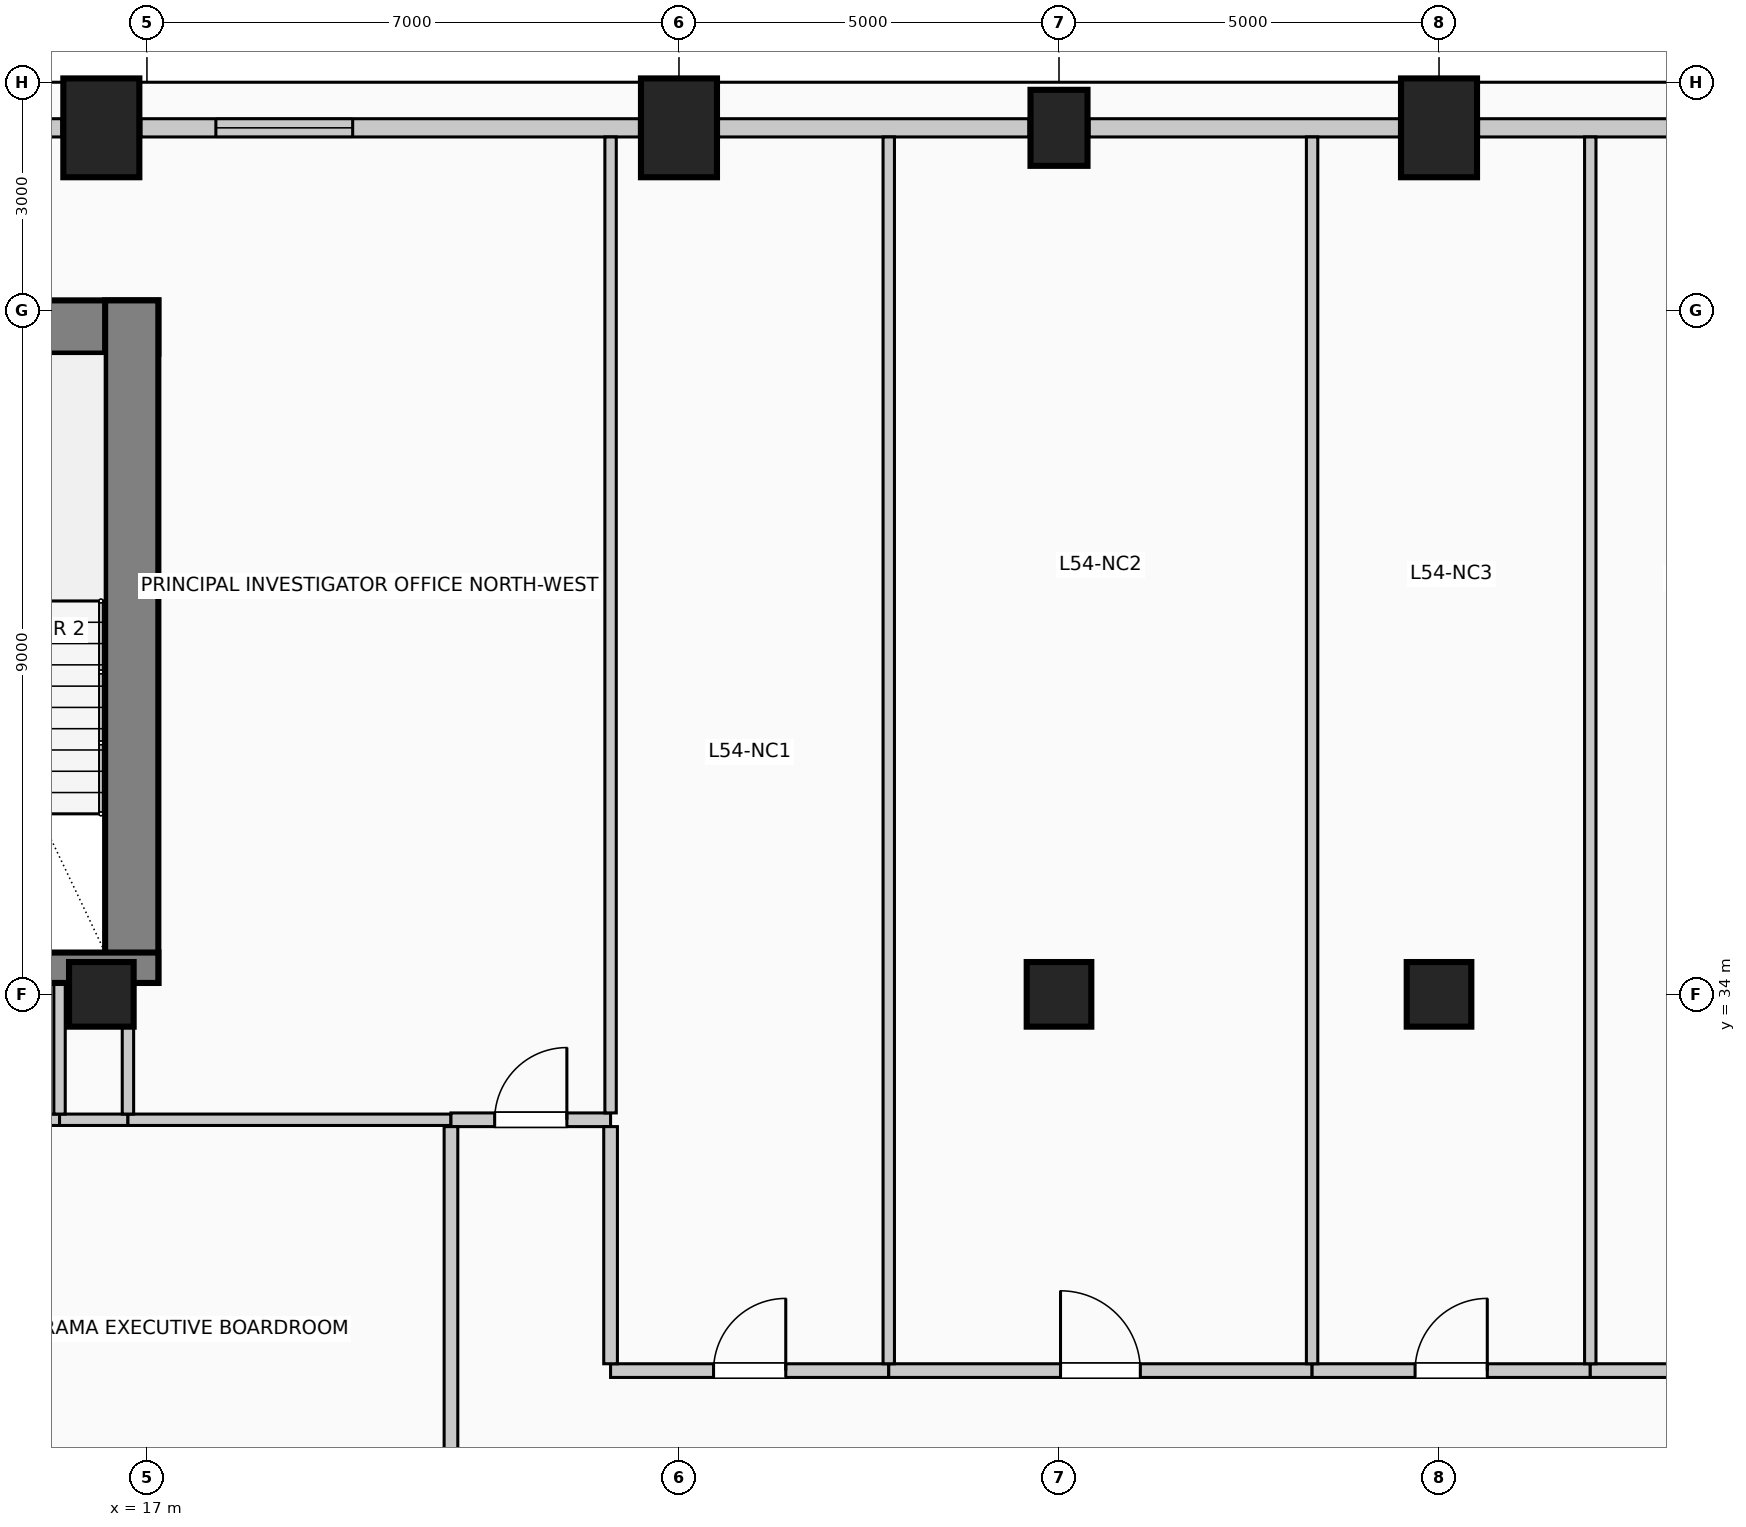
"""IFC4 building model, lengths in metres.
Left out: names, types, materials, properties, quantities, classifications, styles, units other than length and angle.
Written with IfcOpenShell. Run it as: python <this file> out.ifc"""

import sys

from ifc_helpers import new_model, si_unit, direction, frame, frame_2d, origin, origin_2d, place, context, subcontext, project, spatial, rectangle, circle, extrude, element, fill, save


model = new_model("IFC4")
c1 = context("Model", 3, precision=1e-05, world=origin(), true_north=direction((0.0, 1.0)))
c2 = subcontext(c1, "Body", "Model", "MODEL_VIEW")
j1 = project(units=[si_unit("LENGTHUNIT", "METRE"), si_unit("PLANEANGLEUNIT", "RADIAN")], contexts=[c1])
p1 = place(None, origin())
s1 = spatial("IfcSite", under=j1, at=p1, CompositionType="ELEMENT")
p2 = place(p1, origin())
s2 = spatial("IfcBuilding", under=s1, at=p2, CompositionType="ELEMENT")
p3 = place(p2, frame((0.0, 0.0, 222.6)))
s3 = spatial("IfcBuildingStorey", under=s2, at=p3, CompositionType="ELEMENT", Elevation=222.6)
p4 = place(p3, frame((2.85, 42.78, 0.0), z_axis=(0.0, 0.0, 1.0), x_axis=(1.0, 0.0, 0.0)))
e1 = element("IfcWall", 1, at=p4, inside=s3, PredefinedType="SHEAR", context=c2, shape_type="SweptSolid", body=[
    extrude(rectangle(XDim=14.3, YDim=0.7, at=frame_2d((7.15, 0.0))), origin(), (0.0, 0.0, 1.0), 4.0),
])
p5 = place(p3, frame((16.8, 34.15, 0.0), z_axis=(0.0, 0.0, 1.0), x_axis=(0.0, 1.0, 0.0)))
e2 = element("IfcWall", 2, at=p5, inside=s3, PredefinedType="SHEAR", context=c2, shape_type="SweptSolid", body=[
    extrude(rectangle(XDim=8.98, YDim=0.7, at=frame_2d((4.49, 0.0))), origin(), (0.0, 0.0, 1.0), 4.0),
])
p6 = place(p3, frame((12.29, 34.35, 0.0), z_axis=(0.0, 0.0, 1.0), x_axis=(1.0, 0.0, 0.0)))
e3 = element("IfcWall", 3, at=p6, inside=s3, PredefinedType="SHEAR", context=c2, shape_type="SweptSolid", body=[
    extrude(rectangle(XDim=4.86, YDim=0.4, at=frame_2d((2.43, 0.0))), origin(), (0.0, 0.0, 1.0), 4.0),
])
p7 = place(p6, frame((1.4, 0.0, 0.0)))
e4 = element("IfcOpeningElement", 4, at=p7, cuts=e3, PredefinedType="OPENING", context=c2, shape_type="SweptSolid", body=[
    extrude(rectangle(XDim=1.15, YDim=2.2, at=frame_2d((0.575, 1.1))), frame((0.0, 0.21, 0.0), z_axis=(0.0, -1.0, 0.0), x_axis=(1.0, 0.0, 0.0)), (0.0, 0.0, 1.0), 0.42),
])
for number, where, z_axis, x_axis in (
    (5, (16.4, 45.4, 0.0), (0.0, 0.0, 1.0), (1.0, 0.0, 0.0)),
    (6, (24.0, 45.4, 0.0), (0.0, 0.0, 1.0), (1.0, 0.0, 0.0)),
):
    element("IfcColumn", number, at=place(p3, frame(where, z_axis=z_axis, x_axis=x_axis)), inside=s3, PredefinedType="COLUMN", context=c2, shape_type="SweptSolid", body=[
        extrude(rectangle(XDim=1.0, YDim=1.3, at=origin_2d()), origin(), (0.0, 0.0, 1.0), 4.0),
    ])
p8 = place(p3, frame((29.0, 45.4, 0.0), z_axis=(0.0, 0.0, 1.0), x_axis=(1.0, 0.0, 0.0)))
e7 = element("IfcColumn", 7, at=p8, inside=s3, PredefinedType="COLUMN", context=c2, shape_type="SweptSolid", body=[
    extrude(rectangle(XDim=0.75, YDim=1.0, at=origin_2d()), origin(), (0.0, 0.0, 1.0), 4.0),
])
p9 = place(p3, frame((34.0, 45.4, 0.0), z_axis=(0.0, 0.0, 1.0), x_axis=(1.0, 0.0, 0.0)))
e8 = element("IfcColumn", 8, at=p9, inside=s3, PredefinedType="COLUMN", context=c2, shape_type="SweptSolid", body=[
    extrude(rectangle(XDim=1.0, YDim=1.3, at=origin_2d()), origin(), (0.0, 0.0, 1.0), 4.0),
])
for number, where, z_axis, x_axis in (
    (9, (16.4, 34.0, 0.0), (0.0, 0.0, 1.0), (1.0, 0.0, 0.0)),
    (10, (29.0, 34.0, 0.0), (0.0, 0.0, 1.0), (1.0, 0.0, 0.0)),
    (11, (34.0, 34.0, 0.0), (0.0, 0.0, 1.0), (1.0, 0.0, 0.0)),
):
    element("IfcColumn", number, at=place(p3, frame(where, z_axis=z_axis, x_axis=x_axis)), inside=s3, PredefinedType="COLUMN", context=c2, shape_type="SweptSolid", body=[
        extrude(circle(Radius=0.425, at=origin_2d()), origin(), (0.0, 0.0, 1.0), 4.0),
    ])
p10 = place(p3, frame((14.395, 45.4, 0.0), z_axis=(0.0, 0.0, 1.0), x_axis=(1.0, 0.0, 0.0)))
e12 = element("IfcWall", 12, at=p10, inside=s3, PredefinedType="SOLIDWALL", context=c2, shape_type="SweptSolid", body=[
    extrude(rectangle(XDim=1.485, YDim=0.24, at=frame_2d((0.742, 0.0))), origin(), (0.0, 0.0, 1.0), 3.0),
])
p11 = place(p3, frame((16.92, 45.4, 0.0), z_axis=(0.0, 0.0, 1.0), x_axis=(1.0, 0.0, 0.0)))
e13 = element("IfcWall", 13, at=p11, inside=s3, PredefinedType="SOLIDWALL", context=c2, shape_type="SweptSolid", body=[
    extrude(rectangle(XDim=6.56, YDim=0.24, at=frame_2d((3.28, 0.0))), origin(), (0.0, 0.0, 1.0), 3.0),
])
p12 = place(p11, frame((0.987, 0.0, 0.42)))
e14 = element("IfcOpeningElement", 14, at=p12, cuts=e13, PredefinedType="OPENING", context=c2, shape_type="SweptSolid", body=[
    extrude(rectangle(XDim=1.8, YDim=2.2, at=frame_2d((0.9, 1.1))), frame((0.0, 0.13, 0.0), z_axis=(0.0, -1.0, 0.0), x_axis=(1.0, 0.0, 0.0)), (0.0, 0.0, 1.0), 0.26),
])
for number, where, z_axis, x_axis in (
    (15, (24.52, 45.4, 0.0), (0.0, 0.0, 1.0), (1.0, 0.0, 0.0)),
    (16, (29.395, 45.4, 0.0), (0.0, 0.0, 1.0), (1.0, 0.0, 0.0)),
):
    element("IfcWall", number, at=place(p3, frame(where, z_axis=z_axis, x_axis=x_axis)), inside=s3, PredefinedType="SOLIDWALL", context=c2, shape_type="SweptSolid", body=[
        extrude(rectangle(XDim=4.085, YDim=0.24, at=frame_2d((2.042, 0.0))), origin(), (0.0, 0.0, 1.0), 3.0),
    ])
p13 = place(p3, frame((34.52, 45.4, 0.0), z_axis=(0.0, 0.0, 1.0), x_axis=(1.0, 0.0, 0.0)))
e17 = element("IfcWall", 17, at=p13, inside=s3, PredefinedType="SOLIDWALL", context=c2, shape_type="SweptSolid", body=[
    extrude(rectangle(XDim=6.56, YDim=0.24, at=frame_2d((3.28, 0.0))), origin(), (0.0, 0.0, 1.0), 3.0),
])
p14 = place(p13, frame((3.773, 0.0, 0.42)))
e18 = element("IfcOpeningElement", 18, at=p14, cuts=e17, PredefinedType="OPENING", context=c2, shape_type="SweptSolid", body=[
    extrude(rectangle(XDim=1.8, YDim=2.2, at=frame_2d((0.9, 1.1))), frame((0.0, 0.13, 0.0), z_axis=(0.0, -1.0, 0.0), x_axis=(1.0, 0.0, 0.0)), (0.0, 0.0, 1.0), 0.26),
])
p15 = place(p3, frame((23.1, 29.05, 0.0), z_axis=(0.0, 0.0, 1.0), x_axis=(1.0, 0.0, 0.0)))
e19 = element("IfcWall", 19, at=p15, inside=s3, PredefinedType="PARTITIONING", context=c2, shape_type="SweptSolid", body=[
    extrude(rectangle(XDim=3.66, YDim=0.18, at=frame_2d((1.83, 0.0))), origin(), (0.0, 0.0, 1.0), 3.75),
])
p16 = place(p15, frame((1.355, 0.0, 0.0)))
e20 = element("IfcOpeningElement", 20, at=p16, cuts=e19, PredefinedType="OPENING", context=c2, shape_type="SweptSolid", body=[
    extrude(rectangle(XDim=0.95, YDim=2.15, at=frame_2d((0.475, 1.075))), frame((0.0, 0.1, 0.0), z_axis=(0.0, -1.0, 0.0), x_axis=(1.0, 0.0, 0.0)), (0.0, 0.0, 1.0), 0.2),
])
p17 = place(p3, frame((26.76, 29.05, 0.0), z_axis=(0.0, 0.0, 1.0), x_axis=(1.0, 0.0, 0.0)))
e21 = element("IfcWall", 21, at=p17, inside=s3, PredefinedType="PARTITIONING", context=c2, shape_type="SweptSolid", body=[
    extrude(rectangle(XDim=5.57, YDim=0.18, at=frame_2d((2.785, 0.0))), origin(), (0.0, 0.0, 1.0), 3.75),
])
p18 = place(p17, frame((2.26, 0.0, 0.0)))
e22 = element("IfcOpeningElement", 22, at=p18, cuts=e21, PredefinedType="OPENING", context=c2, shape_type="SweptSolid", body=[
    extrude(rectangle(XDim=1.05, YDim=2.15, at=frame_2d((0.525, 1.075))), frame((0.0, 0.1, 0.0), z_axis=(0.0, -1.0, 0.0), x_axis=(1.0, 0.0, 0.0)), (0.0, 0.0, 1.0), 0.2),
])
p19 = place(p3, frame((32.33, 29.05, 0.0), z_axis=(0.0, 0.0, 1.0), x_axis=(1.0, 0.0, 0.0)))
e23 = element("IfcWall", 23, at=p19, inside=s3, PredefinedType="PARTITIONING", context=c2, shape_type="SweptSolid", body=[
    extrude(rectangle(XDim=3.66, YDim=0.18, at=frame_2d((1.83, 0.0))), origin(), (0.0, 0.0, 1.0), 3.75),
])
p20 = place(p19, frame((1.355, 0.0, 0.0)))
e24 = element("IfcOpeningElement", 24, at=p20, cuts=e23, PredefinedType="OPENING", context=c2, shape_type="SweptSolid", body=[
    extrude(rectangle(XDim=0.95, YDim=2.15, at=frame_2d((0.475, 1.075))), frame((0.0, 0.1, 0.0), z_axis=(0.0, -1.0, 0.0), x_axis=(1.0, 0.0, 0.0)), (0.0, 0.0, 1.0), 0.2),
])
p21 = place(p3, frame((35.99, 29.05, 0.0), z_axis=(0.0, 0.0, 1.0), x_axis=(1.0, 0.0, 0.0)))
e25 = element("IfcWall", 25, at=p21, inside=s3, PredefinedType="PARTITIONING", context=c2, shape_type="SweptSolid", body=[
    extrude(rectangle(XDim=5.56, YDim=0.18, at=frame_2d((2.78, 0.0))), origin(), (0.0, 0.0, 1.0), 3.75),
])
p22 = place(p21, frame((2.255, 0.0, 0.0)))
e26 = element("IfcOpeningElement", 26, at=p22, cuts=e25, PredefinedType="OPENING", context=c2, shape_type="SweptSolid", body=[
    extrude(rectangle(XDim=1.05, YDim=2.15, at=frame_2d((0.525, 1.075))), frame((0.0, 0.1, 0.0), z_axis=(0.0, -1.0, 0.0), x_axis=(1.0, 0.0, 0.0)), (0.0, 0.0, 1.0), 0.2),
])
p23 = place(p3, frame((12.33, 32.35, 0.0), z_axis=(0.0, 0.0, 1.0), x_axis=(1.0, 0.0, 0.0)))
e27 = element("IfcWall", 27, at=p23, inside=s3, PredefinedType="PARTITIONING", context=c2, shape_type="SweptSolid", body=[
    extrude(rectangle(XDim=3.52, YDim=0.15, at=frame_2d((1.76, 0.0))), origin(), (0.0, 0.0, 1.0), 3.75),
])
p24 = place(p23, frame((1.235, 0.0, 0.0)))
e28 = element("IfcOpeningElement", 28, at=p24, cuts=e27, PredefinedType="OPENING", context=c2, shape_type="SweptSolid", body=[
    extrude(rectangle(XDim=1.05, YDim=2.15, at=frame_2d((0.525, 1.075))), frame((0.0, 0.085, 0.0), z_axis=(0.0, -1.0, 0.0), x_axis=(1.0, 0.0, 0.0)), (0.0, 0.0, 1.0), 0.17),
])
p25 = place(p3, frame((15.85, 32.35, 0.0), z_axis=(0.0, 0.0, 1.0), x_axis=(1.0, 0.0, 0.0)))
e29 = element("IfcWall", 29, at=p25, inside=s3, PredefinedType="PARTITIONING", context=c2, shape_type="SweptSolid", body=[
    extrude(rectangle(XDim=0.9, YDim=0.15, at=frame_2d((0.45, 0.0))), origin(), (0.0, 0.0, 1.0), 3.75),
])
p26 = place(p3, frame((16.75, 32.35, 0.0), z_axis=(0.0, 0.0, 1.0), x_axis=(1.0, 0.0, 0.0)))
e30 = element("IfcWall", 30, at=p26, inside=s3, PredefinedType="PARTITIONING", context=c2, shape_type="SweptSolid", body=[
    extrude(rectangle(XDim=4.25, YDim=0.15, at=frame_2d((2.125, 0.0))), origin(), (0.0, 0.0, 1.0), 3.75),
])
p27 = place(p3, frame((21.0, 32.35, 0.0), z_axis=(0.0, 0.0, 1.0), x_axis=(1.0, 0.0, 0.0)))
e31 = element("IfcWall", 31, at=p27, inside=s3, PredefinedType="PARTITIONING", context=c2, shape_type="SweptSolid", body=[
    extrude(rectangle(XDim=2.1, YDim=0.18, at=frame_2d((1.05, 0.0))), origin(), (0.0, 0.0, 1.0), 3.75),
])
p28 = place(p27, frame((0.575, 0.0, 0.0)))
e32 = element("IfcOpeningElement", 32, at=p28, cuts=e31, PredefinedType="OPENING", context=c2, shape_type="SweptSolid", body=[
    extrude(rectangle(XDim=0.95, YDim=2.15, at=frame_2d((0.475, 1.075))), frame((0.0, 0.1, 0.0), z_axis=(0.0, -1.0, 0.0), x_axis=(1.0, 0.0, 0.0)), (0.0, 0.0, 1.0), 0.2),
])
p29 = place(p3, frame((15.85, 32.425, 0.0), z_axis=(0.0, 0.0, 1.0), x_axis=(0.0, 1.0, 0.0)))
e33 = element("IfcWall", 33, at=p29, inside=s3, PredefinedType="PARTITIONING", context=c2, shape_type="SweptSolid", body=[
    extrude(rectangle(XDim=1.725, YDim=0.15, at=frame_2d((0.862, 0.0))), origin(), (0.0, 0.0, 1.0), 3.75),
])
p30 = place(p3, frame((16.75, 32.425, 0.0), z_axis=(0.0, 0.0, 1.0), x_axis=(0.0, 1.0, 0.0)))
e34 = element("IfcWall", 34, at=p30, inside=s3, PredefinedType="PARTITIONING", context=c2, shape_type="SweptSolid", body=[
    extrude(rectangle(XDim=1.15, YDim=0.15, at=frame_2d((0.575, 0.0))), origin(), (0.0, 0.0, 1.0), 3.75),
])
p31 = place(p3, frame((21.0, 26.925, 0.0), z_axis=(0.0, 0.0, 1.0), x_axis=(0.0, 1.0, 0.0)))
e35 = element("IfcWall", 35, at=p31, inside=s3, PredefinedType="PARTITIONING", context=c2, shape_type="SweptSolid", body=[
    extrude(rectangle(XDim=5.335, YDim=0.18, at=frame_2d((2.667, 0.0))), origin(), (0.0, 0.0, 1.0), 3.75),
])
p32 = place(p3, frame((23.1, 29.14, 0.0), z_axis=(0.0, 0.0, 1.0), x_axis=(0.0, 1.0, 0.0)))
e36 = element("IfcWall", 36, at=p32, inside=s3, PredefinedType="PARTITIONING", context=c2, shape_type="SweptSolid", body=[
    extrude(rectangle(XDim=3.12, YDim=0.18, at=frame_2d((1.56, 0.0))), origin(), (0.0, 0.0, 1.0), 3.75),
])
p33 = place(p3, frame((23.1, 32.44, 0.0), z_axis=(0.0, 0.0, 1.0), x_axis=(0.0, 1.0, 0.0)))
e37 = element("IfcWall", 37, at=p33, inside=s3, PredefinedType="PARTITIONING", context=c2, shape_type="SweptSolid", body=[
    extrude(rectangle(XDim=12.84, YDim=0.15, at=frame_2d((6.42, 0.0))), origin(), (0.0, 0.0, 1.0), 3.75),
])
for number, where, z_axis, x_axis in (
    (38, (26.76, 29.14, 0.0), (0.0, 0.0, 1.0), (0.0, 1.0, 0.0)),
    (39, (32.33, 29.14, 0.0), (0.0, 0.0, 1.0), (0.0, 1.0, 0.0)),
    (40, (35.99, 29.14, 0.0), (0.0, 0.0, 1.0), (0.0, 1.0, 0.0)),
):
    element("IfcWall", number, at=place(p3, frame(where, z_axis=z_axis, x_axis=x_axis)), inside=s3, PredefinedType="PARTITIONING", context=c2, shape_type="SweptSolid", body=[
        extrude(rectangle(XDim=16.14, YDim=0.15, at=frame_2d((8.07, 0.0))), origin(), (0.0, 0.0, 1.0), 3.75),
    ])
p34 = place(p12, origin())
e41 = element("IfcWindow", 41, at=p34, inside=s3, PartitioningType="SINGLE_PANEL", PredefinedType="WINDOW", context=c2, shape_type="SweptSolid", body=[
    extrude(rectangle(XDim=1.8, YDim=2.2, at=frame_2d((0.9, 1.1))), frame((0.0, 0.03, 0.0), z_axis=(0.0, -1.0, 0.0), x_axis=(1.0, 0.0, 0.0)), (0.0, 0.0, 1.0), 0.06),
])
fill(e14, e41)
p35 = place(p16, origin())
e42 = element("IfcDoor", 42, at=p35, inside=s3, OperationType="SINGLE_SWING_RIGHT", PredefinedType="DOOR", context=c2, shape_type="SweptSolid", body=[
    extrude(rectangle(XDim=0.95, YDim=2.15, at=frame_2d((0.475, 1.075))), frame((0.0, 0.025, 0.0), z_axis=(0.0, -1.0, 0.0), x_axis=(1.0, 0.0, 0.0)), (0.0, 0.0, 1.0), 0.05),
])
fill(e20, e42)
p36 = place(p18, origin())
e43 = element("IfcDoor", 43, at=p36, inside=s3, OperationType="SINGLE_SWING_LEFT", PredefinedType="DOOR", context=c2, shape_type="SweptSolid", body=[
    extrude(rectangle(XDim=1.05, YDim=2.15, at=frame_2d((0.525, 1.075))), frame((0.0, 0.025, 0.0), z_axis=(0.0, -1.0, 0.0), x_axis=(1.0, 0.0, 0.0)), (0.0, 0.0, 1.0), 0.05),
])
fill(e22, e43)
p37 = place(p20, origin())
e44 = element("IfcDoor", 44, at=p37, inside=s3, OperationType="SINGLE_SWING_RIGHT", PredefinedType="DOOR", context=c2, shape_type="SweptSolid", body=[
    extrude(rectangle(XDim=0.95, YDim=2.15, at=frame_2d((0.475, 1.075))), frame((0.0, 0.025, 0.0), z_axis=(0.0, -1.0, 0.0), x_axis=(1.0, 0.0, 0.0)), (0.0, 0.0, 1.0), 0.05),
])
fill(e24, e44)
p38 = place(p28, origin())
e45 = element("IfcDoor", 45, at=p38, inside=s3, OperationType="SINGLE_SWING_RIGHT", PredefinedType="DOOR", context=c2, shape_type="SweptSolid", body=[
    extrude(rectangle(XDim=0.95, YDim=2.15, at=frame_2d((0.475, 1.075))), frame((0.0, 0.025, 0.0), z_axis=(0.0, -1.0, 0.0), x_axis=(1.0, 0.0, 0.0)), (0.0, 0.0, 1.0), 0.05),
])
fill(e32, e45)
save(model, sys.argv[1])
